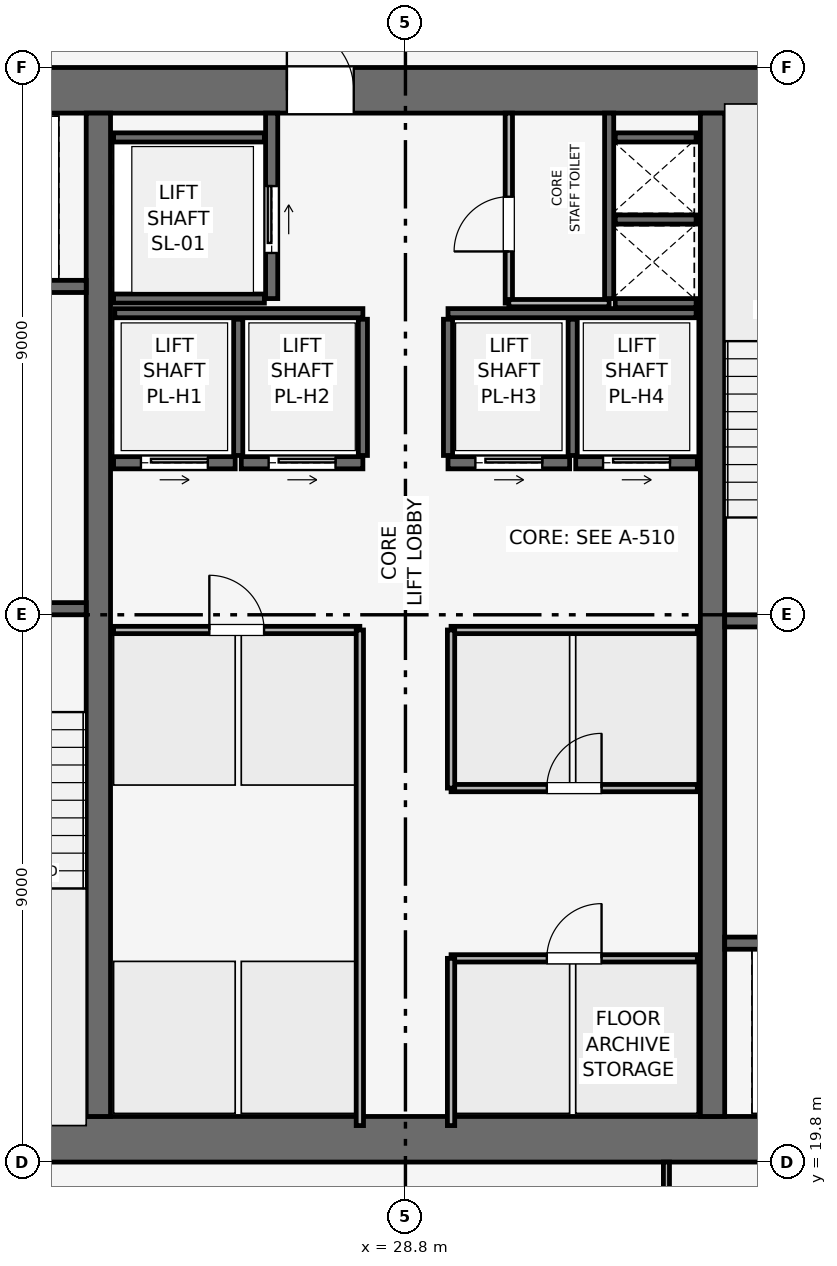
"""IFC4 building model, lengths in metres.
Left out: names, types, materials, properties, quantities, classifications, styles, units other than length and angle.
Written with IfcOpenShell. Run it as: python <this file> out.ifc"""

import sys

from ifc_helpers import new_model, si_unit, direction, frame, frame_2d, origin, place, context, subcontext, project, spatial, rectangle, extrude, element, fill, save


model = new_model("IFC4")
c1 = context("Model", 3, precision=1e-05, world=origin(), true_north=direction((0.0, 1.0)))
c2 = subcontext(c1, "Body", "Model", "MODEL_VIEW")
j1 = project(units=[si_unit("LENGTHUNIT", "METRE"), si_unit("PLANEANGLEUNIT", "RADIAN")], contexts=[c1])
p1 = place(None, origin())
s1 = spatial("IfcSite", under=j1, at=p1, CompositionType="ELEMENT")
p2 = place(p1, origin())
s2 = spatial("IfcBuilding", under=s1, at=p2, CompositionType="ELEMENT")
p3 = place(p2, frame((0.0, 0.0, 265.35)))
s3 = spatial("IfcBuildingStorey", under=s2, at=p3, CompositionType="ELEMENT", Elevation=265.35)
p4 = place(p3, frame((19.8, 20.175, 0.0), z_axis=(0.0, 0.0, 1.0), x_axis=(1.0, 0.0, 0.0)))
e1 = element("IfcWall", 1, at=p4, inside=s3, PredefinedType="SHEAR", context=c2, shape_type="SweptSolid", body=[
    extrude(rectangle(XDim=18.0, YDim=0.75, at=frame_2d((9.0, 0.0))), origin(), (0.0, 0.0, 1.0), 3.75),
])
p5 = place(p3, frame((19.8, 37.425, 0.0), z_axis=(0.0, 0.0, 1.0), x_axis=(1.0, 0.0, 0.0)))
e2 = element("IfcWall", 2, at=p5, inside=s3, PredefinedType="SHEAR", context=c2, shape_type="SweptSolid", body=[
    extrude(rectangle(XDim=18.0, YDim=0.75, at=frame_2d((9.0, 0.0))), origin(), (0.0, 0.0, 1.0), 3.75),
])
p6 = place(p5, frame((7.05, 0.0, 0.0)))
e3 = element("IfcOpeningElement", 3, at=p6, cuts=e2, PredefinedType="OPENING", context=c2, shape_type="SweptSolid", body=[
    extrude(rectangle(XDim=1.1, YDim=2.15, at=frame_2d((0.55, 1.075))), frame((0.0, 0.385, 0.0), z_axis=(0.0, -1.0, 0.0), x_axis=(1.0, 0.0, 0.0)), (0.0, 0.0, 1.0), 0.77),
])
for number, where, z_axis, x_axis in (
    (4, (23.75, 20.55, 0.0), (0.0, 0.0, 1.0), (0.0, 1.0, 0.0)),
    (5, (33.85, 20.55, 0.0), (0.0, 0.0, 1.0), (0.0, 1.0, 0.0)),
):
    element("IfcWall", number, at=place(p3, frame(where, z_axis=z_axis, x_axis=x_axis)), inside=s3, PredefinedType="SHEAR", context=c2, shape_type="SweptSolid", body=[
        extrude(rectangle(XDim=16.5, YDim=0.4, at=frame_2d((8.25, 0.0))), origin(), (0.0, 0.0, 1.0), 3.75),
    ])
p7 = place(p3, frame((20.4, 28.9, 0.0), z_axis=(0.0, 0.0, 1.0), x_axis=(1.0, 0.0, 0.0)))
e6 = element("IfcWall", 6, at=p7, inside=s3, PredefinedType="SHEAR", context=c2, shape_type="SweptSolid", body=[
    extrude(rectangle(XDim=3.15, YDim=0.2, at=frame_2d((1.575, 0.0))), origin(), (0.0, 0.0, 1.0), 3.5),
])
p8 = place(p7, frame((0.8, 0.0, 0.0)))
e7 = element("IfcOpeningElement", 7, at=p8, cuts=e6, PredefinedType="OPENING", context=c2, shape_type="SweptSolid", body=[
    extrude(rectangle(XDim=1.0, YDim=2.1, at=frame_2d((0.5, 1.05))), frame((0.0, 0.11, 0.0), z_axis=(0.0, -1.0, 0.0), x_axis=(1.0, 0.0, 0.0)), (0.0, 0.0, 1.0), 0.22),
])
p9 = place(p3, frame((34.05, 28.7, 0.0), z_axis=(0.0, 0.0, 1.0), x_axis=(1.0, 0.0, 0.0)))
e8 = element("IfcWall", 8, at=p9, inside=s3, PredefinedType="SHEAR", context=c2, shape_type="SweptSolid", body=[
    extrude(rectangle(XDim=3.15, YDim=0.2, at=frame_2d((1.575, 0.0))), origin(), (0.0, 0.0, 1.0), 3.5),
])
p10 = place(p9, frame((0.8, 0.0, 0.0)))
e9 = element("IfcOpeningElement", 9, at=p10, cuts=e8, PredefinedType="OPENING", context=c2, shape_type="SweptSolid", body=[
    extrude(rectangle(XDim=1.0, YDim=2.1, at=frame_2d((0.5, 1.05))), frame((0.0, 0.11, 0.0), z_axis=(0.0, -1.0, 0.0), x_axis=(1.0, 0.0, 0.0)), (0.0, 0.0, 1.0), 0.22),
])
p11 = place(p3, frame((32.15, 34.0, 0.0), z_axis=(0.0, 0.0, 1.0), x_axis=(0.0, 1.0, 0.0)))
e10 = element("IfcWall", 10, at=p11, inside=s3, PredefinedType="SHEAR", context=c2, shape_type="SweptSolid", body=[
    extrude(rectangle(XDim=3.05, YDim=0.15, at=frame_2d((1.525, 0.0))), origin(), (0.0, 0.0, 1.0), 3.5),
])
for number, where, z_axis, x_axis in (
    (11, (32.25, 33.925, 0.0), (0.0, 0.0, 1.0), (1.0, 0.0, 0.0)),
    (12, (32.25, 35.3, 0.0), (0.0, 0.0, 1.0), (1.0, 0.0, 0.0)),
):
    element("IfcWall", number, at=place(p3, frame(where, z_axis=z_axis, x_axis=x_axis)), inside=s3, PredefinedType="SHEAR", context=c2, shape_type="SweptSolid", body=[
        extrude(rectangle(XDim=1.33, YDim=0.15, at=frame_2d((0.665, 0.0))), origin(), (0.0, 0.0, 1.0), 3.5),
    ])
p12 = place(p3, frame((20.5, 34.2, 0.0), z_axis=(0.0, 0.0, 1.0), x_axis=(1.0, 0.0, 0.0)))
e13 = element("IfcWall", 13, at=p12, inside=s3, PredefinedType="SHEAR", context=c2, shape_type="SweptSolid", body=[
    extrude(rectangle(XDim=3.05, YDim=0.2, at=frame_2d((1.525, 0.0))), origin(), (0.0, 0.0, 1.0), 3.5),
])
p13 = place(p12, frame((0.75, 0.0, 0.0)))
e14 = element("IfcOpeningElement", 14, at=p13, cuts=e13, PredefinedType="OPENING", context=c2, shape_type="SweptSolid", body=[
    extrude(rectangle(XDim=1.1, YDim=2.15, at=frame_2d((0.55, 1.075))), frame((0.0, 0.11, 0.0), z_axis=(0.0, -1.0, 0.0), x_axis=(1.0, 0.0, 0.0)), (0.0, 0.0, 1.0), 0.22),
])
p14 = place(p3, frame((34.05, 23.4, 0.0), z_axis=(0.0, 0.0, 1.0), x_axis=(1.0, 0.0, 0.0)))
e15 = element("IfcWall", 15, at=p14, inside=s3, PredefinedType="SHEAR", context=c2, shape_type="SweptSolid", body=[
    extrude(rectangle(XDim=3.05, YDim=0.2, at=frame_2d((1.525, 0.0))), origin(), (0.0, 0.0, 1.0), 3.5),
])
p15 = place(p14, frame((1.2, 0.0, 0.0)))
e16 = element("IfcOpeningElement", 16, at=p15, cuts=e15, PredefinedType="OPENING", context=c2, shape_type="SweptSolid", body=[
    extrude(rectangle(XDim=1.1, YDim=2.15, at=frame_2d((0.55, 1.075))), frame((0.0, 0.11, 0.0), z_axis=(0.0, -1.0, 0.0), x_axis=(1.0, 0.0, 0.0)), (0.0, 0.0, 1.0), 0.22),
])
p16 = place(p3, frame((26.6, 34.0, 0.0), z_axis=(0.0, 0.0, 1.0), x_axis=(0.0, 1.0, 0.0)))
e17 = element("IfcWall", 17, at=p16, inside=s3, PredefinedType="SHEAR", context=c2, shape_type="SweptSolid", body=[
    extrude(rectangle(XDim=3.05, YDim=0.2, at=frame_2d((1.525, 0.0))), origin(), (0.0, 0.0, 1.0), 3.5),
])
p17 = place(p16, frame((0.75, 0.0, 0.0)))
e18 = element("IfcOpeningElement", 18, at=p17, cuts=e17, PredefinedType="OPENING", context=c2, shape_type="SweptSolid", body=[
    extrude(rectangle(XDim=1.1, YDim=2.15, at=frame_2d((0.55, 1.075))), frame((0.0, 0.11, 0.0), z_axis=(0.0, -1.0, 0.0), x_axis=(1.0, 0.0, 0.0)), (0.0, 0.0, 1.0), 0.22),
])
for number, where, z_axis, x_axis in (
    (19, (24.0, 34.0, 0.0), (0.0, 0.0, 1.0), (1.0, 0.0, 0.0)),
    (20, (24.0, 36.65, 0.0), (0.0, 0.0, 1.0), (1.0, 0.0, 0.0)),
):
    element("IfcWall", number, at=place(p3, frame(where, z_axis=z_axis, x_axis=x_axis)), inside=s3, PredefinedType="SHEAR", context=c2, shape_type="SweptSolid", body=[
        extrude(rectangle(XDim=2.48, YDim=0.15, at=frame_2d((1.24, 0.0))), origin(), (0.0, 0.0, 1.0), 3.5),
    ])
p18 = place(p3, frame((24.0, 31.3, 0.0), z_axis=(0.0, 0.0, 1.0), x_axis=(1.0, 0.0, 0.0)))
e21 = element("IfcWall", 21, at=p18, inside=s3, PredefinedType="SHEAR", context=c2, shape_type="SweptSolid", body=[
    extrude(rectangle(XDim=2.0, YDim=0.2, at=frame_2d((1.0, 0.0))), origin(), (0.0, 0.0, 1.0), 3.5),
])
p19 = place(p18, frame((0.45, 0.0, 0.0)))
e22 = element("IfcOpeningElement", 22, at=p19, cuts=e21, PredefinedType="OPENING", context=c2, shape_type="SweptSolid", body=[
    extrude(rectangle(XDim=1.1, YDim=2.15, at=frame_2d((0.55, 1.075))), frame((0.0, 0.11, 0.0), z_axis=(0.0, -1.0, 0.0), x_axis=(1.0, 0.0, 0.0)), (0.0, 0.0, 1.0), 0.22),
])
p20 = place(p3, frame((26.1, 31.3, 0.0), z_axis=(0.0, 0.0, 1.0), x_axis=(1.0, 0.0, 0.0)))
e23 = element("IfcWall", 23, at=p20, inside=s3, PredefinedType="SHEAR", context=c2, shape_type="SweptSolid", body=[
    extrude(rectangle(XDim=2.0, YDim=0.2, at=frame_2d((1.0, 0.0))), origin(), (0.0, 0.0, 1.0), 3.5),
])
p21 = place(p20, frame((0.45, 0.0, 0.0)))
e24 = element("IfcOpeningElement", 24, at=p21, cuts=e23, PredefinedType="OPENING", context=c2, shape_type="SweptSolid", body=[
    extrude(rectangle(XDim=1.1, YDim=2.15, at=frame_2d((0.55, 1.075))), frame((0.0, 0.11, 0.0), z_axis=(0.0, -1.0, 0.0), x_axis=(1.0, 0.0, 0.0)), (0.0, 0.0, 1.0), 0.22),
])
p22 = place(p3, frame((29.5, 31.3, 0.0), z_axis=(0.0, 0.0, 1.0), x_axis=(1.0, 0.0, 0.0)))
e25 = element("IfcWall", 25, at=p22, inside=s3, PredefinedType="SHEAR", context=c2, shape_type="SweptSolid", body=[
    extrude(rectangle(XDim=2.0, YDim=0.2, at=frame_2d((1.0, 0.0))), origin(), (0.0, 0.0, 1.0), 3.5),
])
p23 = place(p22, frame((0.45, 0.0, 0.0)))
e26 = element("IfcOpeningElement", 26, at=p23, cuts=e25, PredefinedType="OPENING", context=c2, shape_type="SweptSolid", body=[
    extrude(rectangle(XDim=1.1, YDim=2.15, at=frame_2d((0.55, 1.075))), frame((0.0, 0.11, 0.0), z_axis=(0.0, -1.0, 0.0), x_axis=(1.0, 0.0, 0.0)), (0.0, 0.0, 1.0), 0.22),
])
p24 = place(p3, frame((31.6, 31.3, 0.0), z_axis=(0.0, 0.0, 1.0), x_axis=(1.0, 0.0, 0.0)))
e27 = element("IfcWall", 27, at=p24, inside=s3, PredefinedType="SHEAR", context=c2, shape_type="SweptSolid", body=[
    extrude(rectangle(XDim=2.0, YDim=0.2, at=frame_2d((1.0, 0.0))), origin(), (0.0, 0.0, 1.0), 3.5),
])
p25 = place(p24, frame((0.45, 0.0, 0.0)))
e28 = element("IfcOpeningElement", 28, at=p25, cuts=e27, PredefinedType="OPENING", context=c2, shape_type="SweptSolid", body=[
    extrude(rectangle(XDim=1.1, YDim=2.15, at=frame_2d((0.55, 1.075))), frame((0.0, 0.11, 0.0), z_axis=(0.0, -1.0, 0.0), x_axis=(1.0, 0.0, 0.0)), (0.0, 0.0, 1.0), 0.22),
])
p26 = place(p3, frame((32.25, 36.65, 0.0), z_axis=(0.0, 0.0, 1.0), x_axis=(1.0, 0.0, 0.0)))
e29 = element("IfcWall", 29, at=p26, inside=s3, PredefinedType="SHEAR", context=c2, shape_type="SweptSolid", body=[
    extrude(rectangle(XDim=1.33, YDim=0.15, at=frame_2d((0.665, 0.0))), origin(), (0.0, 0.0, 1.0), 3.5),
])
for number, where, z_axis, x_axis in (
    (30, (24.02, 33.76, 0.0), (0.0, 0.0, 1.0), (1.0, 0.0, 0.0)),
    (31, (29.5, 33.76, 0.0), (0.0, 0.0, 1.0), (1.0, 0.0, 0.0)),
):
    element("IfcWall", number, at=place(p3, frame(where, z_axis=z_axis, x_axis=x_axis)), inside=s3, PredefinedType="SHEAR", context=c2, shape_type="SweptSolid", body=[
        extrude(rectangle(XDim=4.08, YDim=0.15, at=frame_2d((2.04, 0.0))), origin(), (0.0, 0.0, 1.0), 3.5),
    ])
for number, where, z_axis, x_axis in (
    (32, (26.05, 31.42, 0.0), (0.0, 0.0, 1.0), (0.0, 1.0, 0.0)),
    (33, (28.1, 31.42, 0.0), (0.0, 0.0, 1.0), (0.0, 1.0, 0.0)),
    (34, (29.5, 31.42, 0.0), (0.0, 0.0, 1.0), (0.0, 1.0, 0.0)),
    (35, (31.55, 31.42, 0.0), (0.0, 0.0, 1.0), (0.0, 1.0, 0.0)),
):
    element("IfcWall", number, at=place(p3, frame(where, z_axis=z_axis, x_axis=x_axis)), inside=s3, PredefinedType="SHEAR", context=c2, shape_type="SweptSolid", body=[
        extrude(rectangle(XDim=2.24, YDim=0.15, at=frame_2d((1.12, 0.0))), origin(), (0.0, 0.0, 1.0), 3.5),
    ])
p27 = place(p3, frame((30.5, 33.925, 0.0), z_axis=(0.0, 0.0, 1.0), x_axis=(0.0, 1.0, 0.0)))
e36 = element("IfcWall", 36, at=p27, inside=s3, PredefinedType="PARTITIONING", context=c2, shape_type="SweptSolid", body=[
    extrude(rectangle(XDim=3.125, YDim=0.12, at=frame_2d((1.562, 0.0))), origin(), (0.0, 0.0, 1.0), 3.5),
])
p28 = place(p27, frame((0.85, 0.0, 0.0)))
e37 = element("IfcOpeningElement", 37, at=p28, cuts=e36, PredefinedType="OPENING", context=c2, shape_type="SweptSolid", body=[
    extrude(rectangle(XDim=0.9, YDim=2.1, at=frame_2d((0.45, 1.05))), frame((0.0, 0.07, 0.0), z_axis=(0.0, -1.0, 0.0), x_axis=(1.0, 0.0, 0.0)), (0.0, 0.0, 1.0), 0.14),
])
p29 = place(p3, frame((30.5, 33.925, 0.0), z_axis=(0.0, 0.0, 1.0), x_axis=(1.0, 0.0, 0.0)))
e38 = element("IfcWall", 38, at=p29, inside=s3, PredefinedType="PARTITIONING", context=c2, shape_type="SweptSolid", body=[
    extrude(rectangle(XDim=1.65, YDim=0.12, at=frame_2d((0.825, 0.0))), origin(), (0.0, 0.0, 1.0), 3.5),
])
p30 = place(p3, frame((24.0, 28.55, 0.0), z_axis=(0.0, 0.0, 1.0), x_axis=(1.0, 0.0, 0.0)))
e39 = element("IfcWall", 39, at=p30, inside=s3, PredefinedType="PARTITIONING", context=c2, shape_type="SweptSolid", body=[
    extrude(rectangle(XDim=4.05, YDim=0.12, at=frame_2d((2.025, 0.0))), origin(), (0.0, 0.0, 1.0), 3.5),
])
p31 = place(p30, frame((1.575, 0.0, 0.0)))
e40 = element("IfcOpeningElement", 40, at=p31, cuts=e39, PredefinedType="OPENING", context=c2, shape_type="SweptSolid", body=[
    extrude(rectangle(XDim=0.9, YDim=2.1, at=frame_2d((0.45, 1.05))), frame((0.0, 0.07, 0.0), z_axis=(0.0, -1.0, 0.0), x_axis=(1.0, 0.0, 0.0)), (0.0, 0.0, 1.0), 0.14),
])
p32 = place(p3, frame((28.05, 20.4, 0.0), z_axis=(0.0, 0.0, 1.0), x_axis=(0.0, 1.0, 0.0)))
e41 = element("IfcWall", 41, at=p32, inside=s3, PredefinedType="PARTITIONING", context=c2, shape_type="SweptSolid", body=[
    extrude(rectangle(XDim=8.15, YDim=0.12, at=frame_2d((4.075, 0.0))), origin(), (0.0, 0.0, 1.0), 3.5),
])
p33 = place(p3, frame((29.55, 23.15, 0.0), z_axis=(0.0, 0.0, 1.0), x_axis=(1.0, 0.0, 0.0)))
e42 = element("IfcWall", 42, at=p33, inside=s3, PredefinedType="PARTITIONING", context=c2, shape_type="SweptSolid", body=[
    extrude(rectangle(XDim=4.05, YDim=0.12, at=frame_2d((2.025, 0.0))), origin(), (0.0, 0.0, 1.0), 3.5),
])
p34 = place(p33, frame((1.575, 0.0, 0.0)))
e43 = element("IfcOpeningElement", 43, at=p34, cuts=e42, PredefinedType="OPENING", context=c2, shape_type="SweptSolid", body=[
    extrude(rectangle(XDim=0.9, YDim=2.1, at=frame_2d((0.45, 1.05))), frame((0.0, 0.07, 0.0), z_axis=(0.0, -1.0, 0.0), x_axis=(1.0, 0.0, 0.0)), (0.0, 0.0, 1.0), 0.14),
])
p35 = place(p3, frame((29.55, 20.4, 0.0), z_axis=(0.0, 0.0, 1.0), x_axis=(0.0, 1.0, 0.0)))
e44 = element("IfcWall", 44, at=p35, inside=s3, PredefinedType="PARTITIONING", context=c2, shape_type="SweptSolid", body=[
    extrude(rectangle(XDim=2.75, YDim=0.12, at=frame_2d((1.375, 0.0))), origin(), (0.0, 0.0, 1.0), 3.5),
])
p36 = place(p3, frame((29.55, 25.95, 0.0), z_axis=(0.0, 0.0, 1.0), x_axis=(1.0, 0.0, 0.0)))
e45 = element("IfcWall", 45, at=p36, inside=s3, PredefinedType="PARTITIONING", context=c2, shape_type="SweptSolid", body=[
    extrude(rectangle(XDim=4.05, YDim=0.12, at=frame_2d((2.025, 0.0))), origin(), (0.0, 0.0, 1.0), 3.5),
])
p37 = place(p36, frame((1.575, 0.0, 0.0)))
e46 = element("IfcOpeningElement", 46, at=p37, cuts=e45, PredefinedType="OPENING", context=c2, shape_type="SweptSolid", body=[
    extrude(rectangle(XDim=0.9, YDim=2.1, at=frame_2d((0.45, 1.05))), frame((0.0, 0.07, 0.0), z_axis=(0.0, -1.0, 0.0), x_axis=(1.0, 0.0, 0.0)), (0.0, 0.0, 1.0), 0.14),
])
p38 = place(p3, frame((29.55, 28.55, 0.0), z_axis=(0.0, 0.0, 1.0), x_axis=(1.0, 0.0, 0.0)))
e47 = element("IfcWall", 47, at=p38, inside=s3, PredefinedType="PARTITIONING", context=c2, shape_type="SweptSolid", body=[
    extrude(rectangle(XDim=4.05, YDim=0.12, at=frame_2d((2.025, 0.0))), origin(), (0.0, 0.0, 1.0), 3.5),
])
p39 = place(p3, frame((29.55, 25.95, 0.0), z_axis=(0.0, 0.0, 1.0), x_axis=(0.0, 1.0, 0.0)))
e48 = element("IfcWall", 48, at=p39, inside=s3, PredefinedType="PARTITIONING", context=c2, shape_type="SweptSolid", body=[
    extrude(rectangle(XDim=2.6, YDim=0.12, at=frame_2d((1.3, 0.0))), origin(), (0.0, 0.0, 1.0), 3.5),
])
p40 = place(p3, frame((33.092, 4.03, 0.0), z_axis=(0.0, 0.0, 1.0), x_axis=(0.0, 1.0, 0.0)))
e49 = element("IfcWall", 49, at=p40, inside=s3, PredefinedType="MOVABLE", context=c2, shape_type="SweptSolid", body=[
    extrude(rectangle(XDim=15.77, YDim=0.1, at=frame_2d((7.885, 0.0))), origin(), (0.0, 0.0, 1.0), 3.085),
])
p41 = place(p40, frame((13.37, 0.0, 0.0)))
e50 = element("IfcOpeningElement", 50, at=p41, cuts=e49, PredefinedType="OPENING", context=c2, shape_type="SweptSolid", body=[
    extrude(rectangle(XDim=0.9, YDim=2.1, at=frame_2d((0.45, 1.05))), frame((0.0, 0.06, 0.0), z_axis=(0.0, -1.0, 0.0), x_axis=(1.0, 0.0, 0.0)), (0.0, 0.0, 1.0), 0.12),
])
p42 = place(p17, origin())
e51 = element("IfcDoor", 51, at=p42, inside=s3, OperationType="SLIDING_TO_RIGHT", PredefinedType="DOOR", context=c2, shape_type="SweptSolid", body=[
    extrude(rectangle(XDim=1.1, YDim=2.15, at=frame_2d((0.55, 1.075))), frame((0.0, 0.025, 0.0), z_axis=(0.0, -1.0, 0.0), x_axis=(1.0, 0.0, 0.0)), (0.0, 0.0, 1.0), 0.05),
])
fill(e18, e51)
p43 = place(p19, origin())
e52 = element("IfcDoor", 52, at=p43, inside=s3, OperationType="SLIDING_TO_RIGHT", PredefinedType="DOOR", context=c2, shape_type="SweptSolid", body=[
    extrude(rectangle(XDim=1.1, YDim=2.15, at=frame_2d((0.55, 1.075))), frame((0.0, 0.025, 0.0), z_axis=(0.0, -1.0, 0.0), x_axis=(1.0, 0.0, 0.0)), (0.0, 0.0, 1.0), 0.05),
])
fill(e22, e52)
p44 = place(p21, origin())
e53 = element("IfcDoor", 53, at=p44, inside=s3, OperationType="SLIDING_TO_RIGHT", PredefinedType="DOOR", context=c2, shape_type="SweptSolid", body=[
    extrude(rectangle(XDim=1.1, YDim=2.15, at=frame_2d((0.55, 1.075))), frame((0.0, 0.025, 0.0), z_axis=(0.0, -1.0, 0.0), x_axis=(1.0, 0.0, 0.0)), (0.0, 0.0, 1.0), 0.05),
])
fill(e24, e53)
p45 = place(p23, origin())
e54 = element("IfcDoor", 54, at=p45, inside=s3, OperationType="SLIDING_TO_RIGHT", PredefinedType="DOOR", context=c2, shape_type="SweptSolid", body=[
    extrude(rectangle(XDim=1.1, YDim=2.15, at=frame_2d((0.55, 1.075))), frame((0.0, 0.025, 0.0), z_axis=(0.0, -1.0, 0.0), x_axis=(1.0, 0.0, 0.0)), (0.0, 0.0, 1.0), 0.05),
])
fill(e26, e54)
p46 = place(p25, origin())
e55 = element("IfcDoor", 55, at=p46, inside=s3, OperationType="SLIDING_TO_RIGHT", PredefinedType="DOOR", context=c2, shape_type="SweptSolid", body=[
    extrude(rectangle(XDim=1.1, YDim=2.15, at=frame_2d((0.55, 1.075))), frame((0.0, 0.025, 0.0), z_axis=(0.0, -1.0, 0.0), x_axis=(1.0, 0.0, 0.0)), (0.0, 0.0, 1.0), 0.05),
])
fill(e28, e55)
p47 = place(p28, origin())
e56 = element("IfcDoor", 56, at=p47, inside=s3, OperationType="SINGLE_SWING_LEFT", PredefinedType="DOOR", context=c2, shape_type="SweptSolid", body=[
    extrude(rectangle(XDim=0.9, YDim=2.1, at=frame_2d((0.45, 1.05))), frame((0.0, 0.025, 0.0), z_axis=(0.0, -1.0, 0.0), x_axis=(1.0, 0.0, 0.0)), (0.0, 0.0, 1.0), 0.05),
])
fill(e37, e56)
p48 = place(p31, origin())
e57 = element("IfcDoor", 57, at=p48, inside=s3, OperationType="SINGLE_SWING_LEFT", PredefinedType="DOOR", context=c2, shape_type="SweptSolid", body=[
    extrude(rectangle(XDim=0.9, YDim=2.1, at=frame_2d((0.45, 1.05))), frame((0.0, 0.025, 0.0), z_axis=(0.0, -1.0, 0.0), x_axis=(1.0, 0.0, 0.0)), (0.0, 0.0, 1.0), 0.05),
])
fill(e40, e57)
p49 = place(p34, origin())
e58 = element("IfcDoor", 58, at=p49, inside=s3, OperationType="SINGLE_SWING_RIGHT", PredefinedType="DOOR", context=c2, shape_type="SweptSolid", body=[
    extrude(rectangle(XDim=0.9, YDim=2.1, at=frame_2d((0.45, 1.05))), frame((0.0, 0.025, 0.0), z_axis=(0.0, -1.0, 0.0), x_axis=(1.0, 0.0, 0.0)), (0.0, 0.0, 1.0), 0.05),
])
fill(e43, e58)
p50 = place(p37, origin())
e59 = element("IfcDoor", 59, at=p50, inside=s3, OperationType="SINGLE_SWING_RIGHT", PredefinedType="DOOR", context=c2, shape_type="SweptSolid", body=[
    extrude(rectangle(XDim=0.9, YDim=2.1, at=frame_2d((0.45, 1.05))), frame((0.0, 0.025, 0.0), z_axis=(0.0, -1.0, 0.0), x_axis=(1.0, 0.0, 0.0)), (0.0, 0.0, 1.0), 0.05),
])
fill(e46, e59)
p51 = place(p6, origin())
e60 = element("IfcDoor", 60, at=p51, inside=s3, OperationType="SINGLE_SWING_LEFT", PredefinedType="DOOR", context=c2, shape_type="SweptSolid", body=[
    extrude(rectangle(XDim=1.1, YDim=2.15, at=frame_2d((0.55, 1.075))), frame((0.0, 0.025, 0.0), z_axis=(0.0, -1.0, 0.0), x_axis=(1.0, 0.0, 0.0)), (0.0, 0.0, 1.0), 0.05),
])
fill(e3, e60)
save(model, sys.argv[1])
